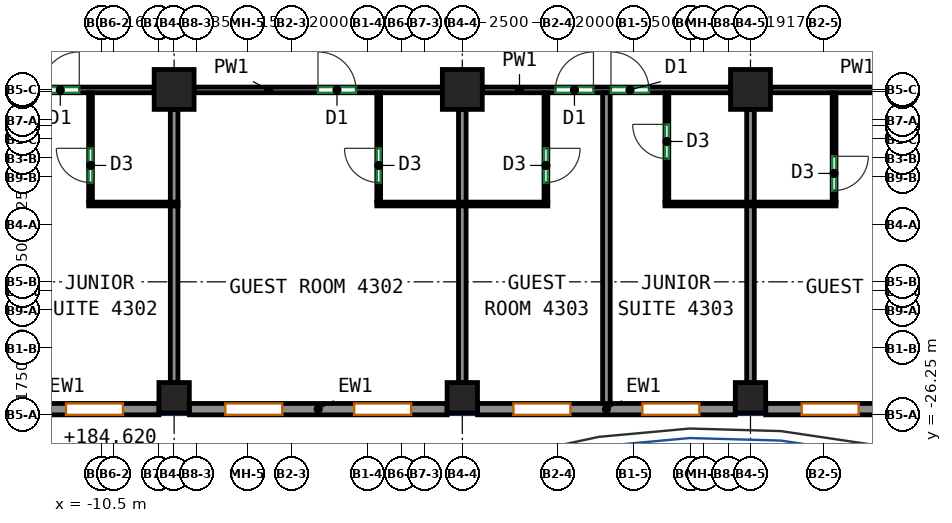
"""IFC4 building model, lengths in metres.
Left out: names, types, materials, properties, quantities, classifications, styles, units other than length and angle.
Written with IfcOpenShell. Run it as: python <this file> out.ifc"""

import sys

from ifc_helpers import new_model, si_unit, direction, frame, frame_2d, origin, origin_2d, place, context, subcontext, project, spatial, rectangle, extrude, source, transform, mapped, element, fill, save


model = new_model("IFC4")
c1 = context("Model", 3, precision=1e-05, world=origin(), true_north=direction((0.0, 1.0)))
c2 = subcontext(c1, "Body", "Model", "MODEL_VIEW")
j1 = project(units=[si_unit("LENGTHUNIT", "METRE"), si_unit("PLANEANGLEUNIT", "RADIAN")], contexts=[c1])
p1 = place(None, origin())
s1 = spatial("IfcSite", under=j1, at=p1, CompositionType="ELEMENT")
p2 = place(p1, origin())
s2 = spatial("IfcBuilding", under=s1, at=p2, CompositionType="ELEMENT")
p3 = place(p2, frame((0.0, 0.0, 182.1)))
s3 = spatial("IfcBuildingStorey", under=s2, at=p3, CompositionType="ELEMENT", Elevation=182.1)
m1 = source(origin(), c2, "Body", "SweptSolid", [
    extrude(rectangle(XDim=0.8, YDim=0.8, at=origin_2d()), origin(), (0.0, 0.0, 1.0), 3.12),
])
p4 = place(p3, frame((-8.583, -25.8, 0.0), z_axis=(0.0, 0.0, 1.0), x_axis=(1.0, 0.0, 0.0)))
e1 = element("IfcColumn", 1, at=p4, inside=s3, PredefinedType="COLUMN", context=c2, shape_type="MappedRepresentation", body=[
    mapped(m1, transform((0.0, 0.0, 0.0))),
])
m2 = source(origin(), c2, "Body", "SweptSolid", [
    extrude(rectangle(XDim=1.05, YDim=1.05, at=origin_2d()), origin(), (0.0, 0.0, 1.0), 3.12),
])
p5 = place(p3, frame((-8.583, -17.688, 0.0), z_axis=(0.0, 0.0, 1.0), x_axis=(1.0, 0.0, 0.0)))
e2 = element("IfcColumn", 2, at=p5, inside=s3, PredefinedType="COLUMN", context=c2, shape_type="MappedRepresentation", body=[
    mapped(m2, transform((0.0, 0.0, 0.0))),
])
p6 = place(p3, frame((-1.0, -25.8, 0.0), z_axis=(0.0, 0.0, 1.0), x_axis=(1.0, 0.0, 0.0)))
e3 = element("IfcColumn", 3, at=p6, inside=s3, PredefinedType="COLUMN", context=c2, shape_type="MappedRepresentation", body=[
    mapped(m1, transform((0.0, 0.0, 0.0))),
])
p7 = place(p3, frame((-1.0, -17.688, 0.0), z_axis=(0.0, 0.0, 1.0), x_axis=(1.0, 0.0, 0.0)))
e4 = element("IfcColumn", 4, at=p7, inside=s3, PredefinedType="COLUMN", context=c2, shape_type="MappedRepresentation", body=[
    mapped(m2, transform((0.0, 0.0, 0.0))),
])
p8 = place(p3, frame((6.583, -25.8, 0.0), z_axis=(0.0, 0.0, 1.0), x_axis=(1.0, 0.0, 0.0)))
e5 = element("IfcColumn", 5, at=p8, inside=s3, PredefinedType="COLUMN", context=c2, shape_type="MappedRepresentation", body=[
    mapped(m1, transform((0.0, 0.0, 0.0))),
])
p9 = place(p3, frame((6.583, -17.688, 0.0), z_axis=(0.0, 0.0, 1.0), x_axis=(1.0, 0.0, 0.0)))
e6 = element("IfcColumn", 6, at=p9, inside=s3, PredefinedType="COLUMN", context=c2, shape_type="MappedRepresentation", body=[
    mapped(m2, transform((0.0, 0.0, 0.0))),
])
m3 = source(origin(), c2, "Body", "SweptSolid", [
    extrude(rectangle(XDim=6.783, YDim=0.3, at=frame_2d((3.392, 0.0))), origin(), (0.0, 0.0, 1.0), 3.12),
])
p10 = place(p3, frame((-15.767, -26.1, 0.0), z_axis=(0.0, 0.0, 1.0), x_axis=(1.0, 0.0, 0.0)))
e7 = element("IfcWall", 7, at=p10, inside=s3, PredefinedType="SOLIDWALL", context=c2, shape_type="MappedRepresentation", body=[
    mapped(m3, transform((0.0, 0.0, 0.0))),
])
p11 = place(p10, frame((0.946, 0.0, 0.85)))
e8 = element("IfcOpeningElement", 8, at=p11, cuts=e7, PredefinedType="OPENING", context=c2, shape_type="SweptSolid", body=[
    extrude(rectangle(XDim=1.5, YDim=1.95, at=frame_2d((0.75, 0.975))), frame((0.0, 0.16, 0.0), z_axis=(0.0, -1.0, 0.0), x_axis=(1.0, 0.0, 0.0)), (0.0, 0.0, 1.0), 0.32),
])
p12 = place(p10, frame((4.338, 0.0, 0.85)))
e9 = element("IfcOpeningElement", 9, at=p12, cuts=e7, PredefinedType="OPENING", context=c2, shape_type="SweptSolid", body=[
    extrude(rectangle(XDim=1.5, YDim=1.95, at=frame_2d((0.75, 0.975))), frame((0.0, 0.16, 0.0), z_axis=(0.0, -1.0, 0.0), x_axis=(1.0, 0.0, 0.0)), (0.0, 0.0, 1.0), 0.32),
])
m4 = source(origin(), c2, "Body", "SweptSolid", [
    extrude(rectangle(XDim=6.783, YDim=0.3, at=frame_2d((3.392, 0.0))), origin(), (0.0, 0.0, 1.0), 3.12),
])
p13 = place(p3, frame((-8.183, -26.1, 0.0), z_axis=(0.0, 0.0, 1.0), x_axis=(1.0, 0.0, 0.0)))
e10 = element("IfcWall", 10, at=p13, inside=s3, PredefinedType="SOLIDWALL", context=c2, shape_type="MappedRepresentation", body=[
    mapped(m4, transform((0.0, 0.0, 0.0))),
])
p14 = place(p13, frame((0.946, 0.0, 0.85)))
e11 = element("IfcOpeningElement", 11, at=p14, cuts=e10, PredefinedType="OPENING", context=c2, shape_type="SweptSolid", body=[
    extrude(rectangle(XDim=1.5, YDim=1.95, at=frame_2d((0.75, 0.975))), frame((0.0, 0.16, 0.0), z_axis=(0.0, -1.0, 0.0), x_axis=(1.0, 0.0, 0.0)), (0.0, 0.0, 1.0), 0.32),
])
p15 = place(p13, frame((4.337, 0.0, 0.85)))
e12 = element("IfcOpeningElement", 12, at=p15, cuts=e10, PredefinedType="OPENING", context=c2, shape_type="SweptSolid", body=[
    extrude(rectangle(XDim=1.5, YDim=1.95, at=frame_2d((0.75, 0.975))), frame((0.0, 0.16, 0.0), z_axis=(0.0, -1.0, 0.0), x_axis=(1.0, 0.0, 0.0)), (0.0, 0.0, 1.0), 0.32),
])
p16 = place(p3, frame((-0.6, -26.1, 0.0), z_axis=(0.0, 0.0, 1.0), x_axis=(1.0, 0.0, 0.0)))
e13 = element("IfcWall", 13, at=p16, inside=s3, PredefinedType="SOLIDWALL", context=c2, shape_type="MappedRepresentation", body=[
    mapped(m4, transform((0.0, 0.0, 0.0))),
])
p17 = place(p16, frame((0.946, 0.0, 0.85)))
e14 = element("IfcOpeningElement", 14, at=p17, cuts=e13, PredefinedType="OPENING", context=c2, shape_type="SweptSolid", body=[
    extrude(rectangle(XDim=1.5, YDim=1.95, at=frame_2d((0.75, 0.975))), frame((0.0, 0.16, 0.0), z_axis=(0.0, -1.0, 0.0), x_axis=(1.0, 0.0, 0.0)), (0.0, 0.0, 1.0), 0.32),
])
p18 = place(p16, frame((4.337, 0.0, 0.85)))
e15 = element("IfcOpeningElement", 15, at=p18, cuts=e13, PredefinedType="OPENING", context=c2, shape_type="SweptSolid", body=[
    extrude(rectangle(XDim=1.5, YDim=1.95, at=frame_2d((0.75, 0.975))), frame((0.0, 0.16, 0.0), z_axis=(0.0, -1.0, 0.0), x_axis=(1.0, 0.0, 0.0)), (0.0, 0.0, 1.0), 0.32),
])
p19 = place(p3, frame((6.983, -26.1, 0.0), z_axis=(0.0, 0.0, 1.0), x_axis=(1.0, 0.0, 0.0)))
e16 = element("IfcWall", 16, at=p19, inside=s3, PredefinedType="SOLIDWALL", context=c2, shape_type="MappedRepresentation", body=[
    mapped(m3, transform((0.0, 0.0, 0.0))),
])
p20 = place(p19, frame((0.946, 0.0, 0.85)))
e17 = element("IfcOpeningElement", 17, at=p20, cuts=e16, PredefinedType="OPENING", context=c2, shape_type="SweptSolid", body=[
    extrude(rectangle(XDim=1.5, YDim=1.95, at=frame_2d((0.75, 0.975))), frame((0.0, 0.16, 0.0), z_axis=(0.0, -1.0, 0.0), x_axis=(1.0, 0.0, 0.0)), (0.0, 0.0, 1.0), 0.32),
])
p21 = place(p19, frame((4.338, 0.0, 0.85)))
e18 = element("IfcOpeningElement", 18, at=p21, cuts=e16, PredefinedType="OPENING", context=c2, shape_type="SweptSolid", body=[
    extrude(rectangle(XDim=1.5, YDim=1.95, at=frame_2d((0.75, 0.975))), frame((0.0, 0.16, 0.0), z_axis=(0.0, -1.0, 0.0), x_axis=(1.0, 0.0, 0.0)), (0.0, 0.0, 1.0), 0.32),
])
p22 = place(p3, frame((-15.642, -17.7, 0.0), z_axis=(0.0, 0.0, 1.0), x_axis=(1.0, 0.0, 0.0)))
e19 = element("IfcWall", 19, at=p22, inside=s3, PredefinedType="PARTITIONING", context=c2, shape_type="SweptSolid", body=[
    extrude(rectangle(XDim=6.534, YDim=0.15, at=frame_2d((3.267, 0.0))), origin(), (0.0, 0.0, 1.0), 3.12),
])
p23 = place(p22, frame((3.563, 0.0, 0.0)))
e20 = element("IfcOpeningElement", 20, at=p23, cuts=e19, PredefinedType="OPENING", context=c2, shape_type="SweptSolid", body=[
    extrude(rectangle(XDim=1.0, YDim=2.1, at=frame_2d((0.5, 1.05))), frame((0.0, 0.085, 0.0), z_axis=(0.0, -1.0, 0.0), x_axis=(1.0, 0.0, 0.0)), (0.0, 0.0, 1.0), 0.17),
])
p24 = place(p3, frame((-8.058, -17.7, 0.0), z_axis=(0.0, 0.0, 1.0), x_axis=(1.0, 0.0, 0.0)))
e21 = element("IfcWall", 21, at=p24, inside=s3, PredefinedType="PARTITIONING", context=c2, shape_type="SweptSolid", body=[
    extrude(rectangle(XDim=6.533, YDim=0.15, at=frame_2d((3.267, 0.0))), origin(), (0.0, 0.0, 1.0), 3.12),
])
p25 = place(p24, frame((3.26, 0.0, 0.0)))
e22 = element("IfcOpeningElement", 22, at=p25, cuts=e21, PredefinedType="OPENING", context=c2, shape_type="SweptSolid", body=[
    extrude(rectangle(XDim=1.0, YDim=2.1, at=frame_2d((0.5, 1.05))), frame((0.0, 0.085, 0.0), z_axis=(0.0, -1.0, 0.0), x_axis=(1.0, 0.0, 0.0)), (0.0, 0.0, 1.0), 0.17),
])
p26 = place(p3, frame((-0.475, -17.7, 0.0), z_axis=(0.0, 0.0, 1.0), x_axis=(1.0, 0.0, 0.0)))
e23 = element("IfcWall", 23, at=p26, inside=s3, PredefinedType="PARTITIONING", context=c2, shape_type="SweptSolid", body=[
    extrude(rectangle(XDim=6.533, YDim=0.15, at=frame_2d((3.267, 0.0))), origin(), (0.0, 0.0, 1.0), 3.12),
])
p27 = place(p26, frame((1.926, 0.0, 0.0)))
e24 = element("IfcOpeningElement", 24, at=p27, cuts=e23, PredefinedType="OPENING", context=c2, shape_type="SweptSolid", body=[
    extrude(rectangle(XDim=1.0, YDim=2.1, at=frame_2d((0.5, 1.05))), frame((0.0, 0.085, 0.0), z_axis=(0.0, -1.0, 0.0), x_axis=(1.0, 0.0, 0.0)), (0.0, 0.0, 1.0), 0.17),
])
p28 = place(p26, frame((3.387, 0.0, 0.0)))
e25 = element("IfcOpeningElement", 25, at=p28, cuts=e23, PredefinedType="OPENING", context=c2, shape_type="SweptSolid", body=[
    extrude(rectangle(XDim=1.0, YDim=2.1, at=frame_2d((0.5, 1.05))), frame((0.0, 0.085, 0.0), z_axis=(0.0, -1.0, 0.0), x_axis=(1.0, 0.0, 0.0)), (0.0, 0.0, 1.0), 0.17),
])
p29 = place(p3, frame((7.108, -17.7, 0.0), z_axis=(0.0, 0.0, 1.0), x_axis=(1.0, 0.0, 0.0)))
e26 = element("IfcWall", 26, at=p29, inside=s3, PredefinedType="PARTITIONING", context=c2, shape_type="SweptSolid", body=[
    extrude(rectangle(XDim=6.534, YDim=0.15, at=frame_2d((3.267, 0.0))), origin(), (0.0, 0.0, 1.0), 3.12),
])
p30 = place(p29, frame((4.722, 0.0, 0.0)))
e27 = element("IfcOpeningElement", 27, at=p30, cuts=e26, PredefinedType="OPENING", context=c2, shape_type="SweptSolid", body=[
    extrude(rectangle(XDim=1.0, YDim=2.1, at=frame_2d((0.5, 1.05))), frame((0.0, 0.085, 0.0), z_axis=(0.0, -1.0, 0.0), x_axis=(1.0, 0.0, 0.0)), (0.0, 0.0, 1.0), 0.17),
])
p31 = place(p3, frame((-10.783, -20.652, 0.0), z_axis=(0.0, 0.0, 1.0), x_axis=(0.0, 1.0, 0.0)))
e28 = element("IfcWall", 28, at=p31, inside=s3, PredefinedType="PARTITIONING", context=c2, shape_type="SweptSolid", body=[
    extrude(rectangle(XDim=2.875, YDim=0.1, at=frame_2d((1.438, 0.0))), origin(), (0.0, 0.0, 1.0), 3.12),
])
p32 = place(p31, frame((0.515, 0.0, 0.0)))
e29 = element("IfcOpeningElement", 29, at=p32, cuts=e28, PredefinedType="OPENING", context=c2, shape_type="SweptSolid", body=[
    extrude(rectangle(XDim=0.9, YDim=2.1, at=frame_2d((0.45, 1.05))), frame((0.0, 0.06, 0.0), z_axis=(0.0, -1.0, 0.0), x_axis=(1.0, 0.0, 0.0)), (0.0, 0.0, 1.0), 0.12),
])
p33 = place(p3, frame((-10.833, -20.702, 0.0), z_axis=(0.0, 0.0, 1.0), x_axis=(1.0, 0.0, 0.0)))
e30 = element("IfcWall", 30, at=p33, inside=s3, PredefinedType="PARTITIONING", context=c2, shape_type="SweptSolid", body=[
    extrude(rectangle(XDim=2.35, YDim=0.1, at=frame_2d((1.175, 0.0))), origin(), (0.0, 0.0, 1.0), 3.12),
])
p34 = place(p3, frame((-8.583, -25.4, 0.0), z_axis=(0.0, 0.0, 1.0), x_axis=(0.0, 1.0, 0.0)))
e31 = element("IfcWall", 31, at=p34, inside=s3, PredefinedType="PARTITIONING", context=c2, shape_type="SweptSolid", body=[
    extrude(rectangle(XDim=4.648, YDim=0.2, at=frame_2d((2.324, 0.0))), origin(), (0.0, 0.0, 1.0), 3.12),
])
p35 = place(p3, frame((-8.583, -20.652, 0.0), z_axis=(0.0, 0.0, 1.0), x_axis=(0.0, 1.0, 0.0)))
e32 = element("IfcWall", 32, at=p35, inside=s3, PredefinedType="PARTITIONING", context=c2, shape_type="SweptSolid", body=[
    extrude(rectangle(XDim=2.44, YDim=0.2, at=frame_2d((1.22, 0.0))), origin(), (0.0, 0.0, 1.0), 3.12),
])
p36 = place(p3, frame((-3.2, -20.652, 0.0), z_axis=(0.0, 0.0, 1.0), x_axis=(0.0, 1.0, 0.0)))
e33 = element("IfcWall", 33, at=p36, inside=s3, PredefinedType="PARTITIONING", context=c2, shape_type="SweptSolid", body=[
    extrude(rectangle(XDim=2.875, YDim=0.1, at=frame_2d((1.438, 0.0))), origin(), (0.0, 0.0, 1.0), 3.12),
])
p37 = place(p36, frame((0.515, 0.0, 0.0)))
e34 = element("IfcOpeningElement", 34, at=p37, cuts=e33, PredefinedType="OPENING", context=c2, shape_type="SweptSolid", body=[
    extrude(rectangle(XDim=0.9, YDim=2.1, at=frame_2d((0.45, 1.05))), frame((0.0, 0.06, 0.0), z_axis=(0.0, -1.0, 0.0), x_axis=(1.0, 0.0, 0.0)), (0.0, 0.0, 1.0), 0.12),
])
p38 = place(p3, frame((-3.25, -20.702, 0.0), z_axis=(0.0, 0.0, 1.0), x_axis=(1.0, 0.0, 0.0)))
e35 = element("IfcWall", 35, at=p38, inside=s3, PredefinedType="PARTITIONING", context=c2, shape_type="SweptSolid", body=[
    extrude(rectangle(XDim=4.5, YDim=0.1, at=frame_2d((2.25, 0.0))), origin(), (0.0, 0.0, 1.0), 3.12),
])
p39 = place(p3, frame((-1.0, -25.4, 0.0), z_axis=(0.0, 0.0, 1.0), x_axis=(0.0, 1.0, 0.0)))
e36 = element("IfcWall", 36, at=p39, inside=s3, PredefinedType="PARTITIONING", context=c2, shape_type="SweptSolid", body=[
    extrude(rectangle(XDim=4.648, YDim=0.2, at=frame_2d((2.324, 0.0))), origin(), (0.0, 0.0, 1.0), 3.12),
])
p40 = place(p3, frame((-1.0, -20.652, 0.0), z_axis=(0.0, 0.0, 1.0), x_axis=(0.0, 1.0, 0.0)))
e37 = element("IfcWall", 37, at=p40, inside=s3, PredefinedType="PARTITIONING", context=c2, shape_type="SweptSolid", body=[
    extrude(rectangle(XDim=2.44, YDim=0.2, at=frame_2d((1.22, 0.0))), origin(), (0.0, 0.0, 1.0), 3.12),
])
p41 = place(p3, frame((1.2, -17.777, 0.0), z_axis=(0.0, 0.0, 1.0), x_axis=(0.0, -1.0, 0.0)))
e38 = element("IfcWall", 38, at=p41, inside=s3, PredefinedType="PARTITIONING", context=c2, shape_type="SweptSolid", body=[
    extrude(rectangle(XDim=2.875, YDim=0.1, at=frame_2d((1.438, 0.0))), origin(), (0.0, 0.0, 1.0), 3.12),
])
p42 = place(p41, frame((1.46, 0.0, 0.0)))
e39 = element("IfcOpeningElement", 39, at=p42, cuts=e38, PredefinedType="OPENING", context=c2, shape_type="SweptSolid", body=[
    extrude(rectangle(XDim=0.9, YDim=2.1, at=frame_2d((0.45, 1.05))), frame((0.0, 0.06, 0.0), z_axis=(0.0, -1.0, 0.0), x_axis=(1.0, 0.0, 0.0)), (0.0, 0.0, 1.0), 0.12),
])
p43 = place(p3, frame((2.792, -26.0, 0.0), z_axis=(0.0, 0.0, 1.0), x_axis=(0.0, 1.0, 0.0)))
e40 = element("IfcWall", 40, at=p43, inside=s3, PredefinedType="PARTITIONING", context=c2, shape_type="SweptSolid", body=[
    extrude(rectangle(XDim=8.223, YDim=0.2, at=frame_2d((4.111, 0.0))), origin(), (0.0, 0.0, 1.0), 3.12),
])
p44 = place(p3, frame((4.383, -20.652, 0.0), z_axis=(0.0, 0.0, 1.0), x_axis=(0.0, 1.0, 0.0)))
e41 = element("IfcWall", 41, at=p44, inside=s3, PredefinedType="PARTITIONING", context=c2, shape_type="SweptSolid", body=[
    extrude(rectangle(XDim=2.875, YDim=0.1, at=frame_2d((1.438, 0.0))), origin(), (0.0, 0.0, 1.0), 3.12),
])
p45 = place(p44, frame((1.145, 0.0, 0.0)))
e42 = element("IfcOpeningElement", 42, at=p45, cuts=e41, PredefinedType="OPENING", context=c2, shape_type="SweptSolid", body=[
    extrude(rectangle(XDim=0.9, YDim=2.1, at=frame_2d((0.45, 1.05))), frame((0.0, 0.06, 0.0), z_axis=(0.0, -1.0, 0.0), x_axis=(1.0, 0.0, 0.0)), (0.0, 0.0, 1.0), 0.12),
])
p46 = place(p3, frame((4.333, -20.702, 0.0), z_axis=(0.0, 0.0, 1.0), x_axis=(1.0, 0.0, 0.0)))
e43 = element("IfcWall", 43, at=p46, inside=s3, PredefinedType="PARTITIONING", context=c2, shape_type="SweptSolid", body=[
    extrude(rectangle(XDim=4.5, YDim=0.1, at=frame_2d((2.25, 0.0))), origin(), (0.0, 0.0, 1.0), 3.12),
])
p47 = place(p3, frame((6.583, -25.4, 0.0), z_axis=(0.0, 0.0, 1.0), x_axis=(0.0, 1.0, 0.0)))
e44 = element("IfcWall", 44, at=p47, inside=s3, PredefinedType="PARTITIONING", context=c2, shape_type="SweptSolid", body=[
    extrude(rectangle(XDim=4.648, YDim=0.2, at=frame_2d((2.324, 0.0))), origin(), (0.0, 0.0, 1.0), 3.12),
])
p48 = place(p3, frame((6.583, -20.652, 0.0), z_axis=(0.0, 0.0, 1.0), x_axis=(0.0, 1.0, 0.0)))
e45 = element("IfcWall", 45, at=p48, inside=s3, PredefinedType="PARTITIONING", context=c2, shape_type="SweptSolid", body=[
    extrude(rectangle(XDim=2.44, YDim=0.2, at=frame_2d((1.22, 0.0))), origin(), (0.0, 0.0, 1.0), 3.12),
])
p49 = place(p3, frame((8.783, -17.777, 0.0), z_axis=(0.0, 0.0, 1.0), x_axis=(0.0, -1.0, 0.0)))
e46 = element("IfcWall", 46, at=p49, inside=s3, PredefinedType="PARTITIONING", context=c2, shape_type="SweptSolid", body=[
    extrude(rectangle(XDim=2.875, YDim=0.1, at=frame_2d((1.438, 0.0))), origin(), (0.0, 0.0, 1.0), 3.12),
])
p50 = place(p49, frame((1.67, 0.0, 0.0)))
e47 = element("IfcOpeningElement", 47, at=p50, cuts=e46, PredefinedType="OPENING", context=c2, shape_type="SweptSolid", body=[
    extrude(rectangle(XDim=0.9, YDim=2.1, at=frame_2d((0.45, 1.05))), frame((0.0, 0.06, 0.0), z_axis=(0.0, -1.0, 0.0), x_axis=(1.0, 0.0, 0.0)), (0.0, 0.0, 1.0), 0.12),
])
p51 = place(p12, origin())
e48 = element("IfcWindow", 48, at=p51, inside=s3, PartitioningType="SINGLE_PANEL", PredefinedType="WINDOW", context=c2, shape_type="SweptSolid", body=[
    extrude(rectangle(XDim=1.5, YDim=1.95, at=frame_2d((0.75, 0.975))), frame((0.0, 0.03, 0.0), z_axis=(0.0, -1.0, 0.0), x_axis=(1.0, 0.0, 0.0)), (0.0, 0.0, 1.0), 0.06),
])
fill(e9, e48)
p52 = place(p14, origin())
e49 = element("IfcWindow", 49, at=p52, inside=s3, PartitioningType="SINGLE_PANEL", PredefinedType="WINDOW", context=c2, shape_type="SweptSolid", body=[
    extrude(rectangle(XDim=1.5, YDim=1.95, at=frame_2d((0.75, 0.975))), frame((0.0, 0.03, 0.0), z_axis=(0.0, -1.0, 0.0), x_axis=(1.0, 0.0, 0.0)), (0.0, 0.0, 1.0), 0.06),
])
fill(e11, e49)
p53 = place(p15, origin())
e50 = element("IfcWindow", 50, at=p53, inside=s3, PartitioningType="SINGLE_PANEL", PredefinedType="WINDOW", context=c2, shape_type="SweptSolid", body=[
    extrude(rectangle(XDim=1.5, YDim=1.95, at=frame_2d((0.75, 0.975))), frame((0.0, 0.03, 0.0), z_axis=(0.0, -1.0, 0.0), x_axis=(1.0, 0.0, 0.0)), (0.0, 0.0, 1.0), 0.06),
])
fill(e12, e50)
p54 = place(p17, origin())
e51 = element("IfcWindow", 51, at=p54, inside=s3, PartitioningType="SINGLE_PANEL", PredefinedType="WINDOW", context=c2, shape_type="SweptSolid", body=[
    extrude(rectangle(XDim=1.5, YDim=1.95, at=frame_2d((0.75, 0.975))), frame((0.0, 0.03, 0.0), z_axis=(0.0, -1.0, 0.0), x_axis=(1.0, 0.0, 0.0)), (0.0, 0.0, 1.0), 0.06),
])
fill(e14, e51)
p55 = place(p18, origin())
e52 = element("IfcWindow", 52, at=p55, inside=s3, PartitioningType="SINGLE_PANEL", PredefinedType="WINDOW", context=c2, shape_type="SweptSolid", body=[
    extrude(rectangle(XDim=1.5, YDim=1.95, at=frame_2d((0.75, 0.975))), frame((0.0, 0.03, 0.0), z_axis=(0.0, -1.0, 0.0), x_axis=(1.0, 0.0, 0.0)), (0.0, 0.0, 1.0), 0.06),
])
fill(e15, e52)
p56 = place(p20, origin())
e53 = element("IfcWindow", 53, at=p56, inside=s3, PartitioningType="SINGLE_PANEL", PredefinedType="WINDOW", context=c2, shape_type="SweptSolid", body=[
    extrude(rectangle(XDim=1.5, YDim=1.95, at=frame_2d((0.75, 0.975))), frame((0.0, 0.03, 0.0), z_axis=(0.0, -1.0, 0.0), x_axis=(1.0, 0.0, 0.0)), (0.0, 0.0, 1.0), 0.06),
])
fill(e17, e53)
p57 = place(p50, origin())
e54 = element("IfcDoor", 54, at=p57, inside=s3, OperationType="SINGLE_SWING_LEFT", PredefinedType="DOOR", context=c2, shape_type="SweptSolid", body=[
    extrude(rectangle(XDim=0.9, YDim=2.1, at=frame_2d((0.45, 1.05))), frame((0.0, 0.025, 0.0), z_axis=(0.0, -1.0, 0.0), x_axis=(1.0, 0.0, 0.0)), (0.0, 0.0, 1.0), 0.05),
])
fill(e47, e54)
p58 = place(p32, origin())
e55 = element("IfcDoor", 55, at=p58, inside=s3, OperationType="SINGLE_SWING_RIGHT", PredefinedType="DOOR", context=c2, shape_type="SweptSolid", body=[
    extrude(rectangle(XDim=0.9, YDim=2.1, at=frame_2d((0.45, 1.05))), frame((0.0, 0.025, 0.0), z_axis=(0.0, -1.0, 0.0), x_axis=(1.0, 0.0, 0.0)), (0.0, 0.0, 1.0), 0.05),
])
fill(e29, e55)
p59 = place(p37, origin())
e56 = element("IfcDoor", 56, at=p59, inside=s3, OperationType="SINGLE_SWING_RIGHT", PredefinedType="DOOR", context=c2, shape_type="SweptSolid", body=[
    extrude(rectangle(XDim=0.9, YDim=2.1, at=frame_2d((0.45, 1.05))), frame((0.0, 0.025, 0.0), z_axis=(0.0, -1.0, 0.0), x_axis=(1.0, 0.0, 0.0)), (0.0, 0.0, 1.0), 0.05),
])
fill(e34, e56)
p60 = place(p42, origin())
e57 = element("IfcDoor", 57, at=p60, inside=s3, OperationType="SINGLE_SWING_LEFT", PredefinedType="DOOR", context=c2, shape_type="SweptSolid", body=[
    extrude(rectangle(XDim=0.9, YDim=2.1, at=frame_2d((0.45, 1.05))), frame((0.0, 0.025, 0.0), z_axis=(0.0, -1.0, 0.0), x_axis=(1.0, 0.0, 0.0)), (0.0, 0.0, 1.0), 0.05),
])
fill(e39, e57)
p61 = place(p45, origin())
e58 = element("IfcDoor", 58, at=p61, inside=s3, OperationType="SINGLE_SWING_RIGHT", PredefinedType="DOOR", context=c2, shape_type="SweptSolid", body=[
    extrude(rectangle(XDim=0.9, YDim=2.1, at=frame_2d((0.45, 1.05))), frame((0.0, 0.025, 0.0), z_axis=(0.0, -1.0, 0.0), x_axis=(1.0, 0.0, 0.0)), (0.0, 0.0, 1.0), 0.05),
])
fill(e42, e58)
p62 = place(p23, origin())
e59 = element("IfcDoor", 59, at=p62, inside=s3, OperationType="SINGLE_SWING_RIGHT", PredefinedType="DOOR", context=c2, shape_type="SweptSolid", body=[
    extrude(rectangle(XDim=1.0, YDim=2.1, at=frame_2d((0.5, 1.05))), frame((0.0, 0.025, 0.0), z_axis=(0.0, -1.0, 0.0), x_axis=(1.0, 0.0, 0.0)), (0.0, 0.0, 1.0), 0.05),
])
fill(e20, e59)
p63 = place(p25, origin())
e60 = element("IfcDoor", 60, at=p63, inside=s3, OperationType="SINGLE_SWING_LEFT", PredefinedType="DOOR", context=c2, shape_type="SweptSolid", body=[
    extrude(rectangle(XDim=1.0, YDim=2.1, at=frame_2d((0.5, 1.05))), frame((0.0, 0.025, 0.0), z_axis=(0.0, -1.0, 0.0), x_axis=(1.0, 0.0, 0.0)), (0.0, 0.0, 1.0), 0.05),
])
fill(e22, e60)
p64 = place(p27, origin())
e61 = element("IfcDoor", 61, at=p64, inside=s3, OperationType="SINGLE_SWING_RIGHT", PredefinedType="DOOR", context=c2, shape_type="SweptSolid", body=[
    extrude(rectangle(XDim=1.0, YDim=2.1, at=frame_2d((0.5, 1.05))), frame((0.0, 0.025, 0.0), z_axis=(0.0, -1.0, 0.0), x_axis=(1.0, 0.0, 0.0)), (0.0, 0.0, 1.0), 0.05),
])
fill(e24, e61)
p65 = place(p28, origin())
e62 = element("IfcDoor", 62, at=p65, inside=s3, OperationType="SINGLE_SWING_LEFT", PredefinedType="DOOR", context=c2, shape_type="SweptSolid", body=[
    extrude(rectangle(XDim=1.0, YDim=2.1, at=frame_2d((0.5, 1.05))), frame((0.0, 0.025, 0.0), z_axis=(0.0, -1.0, 0.0), x_axis=(1.0, 0.0, 0.0)), (0.0, 0.0, 1.0), 0.05),
])
fill(e25, e62)
save(model, sys.argv[1])
